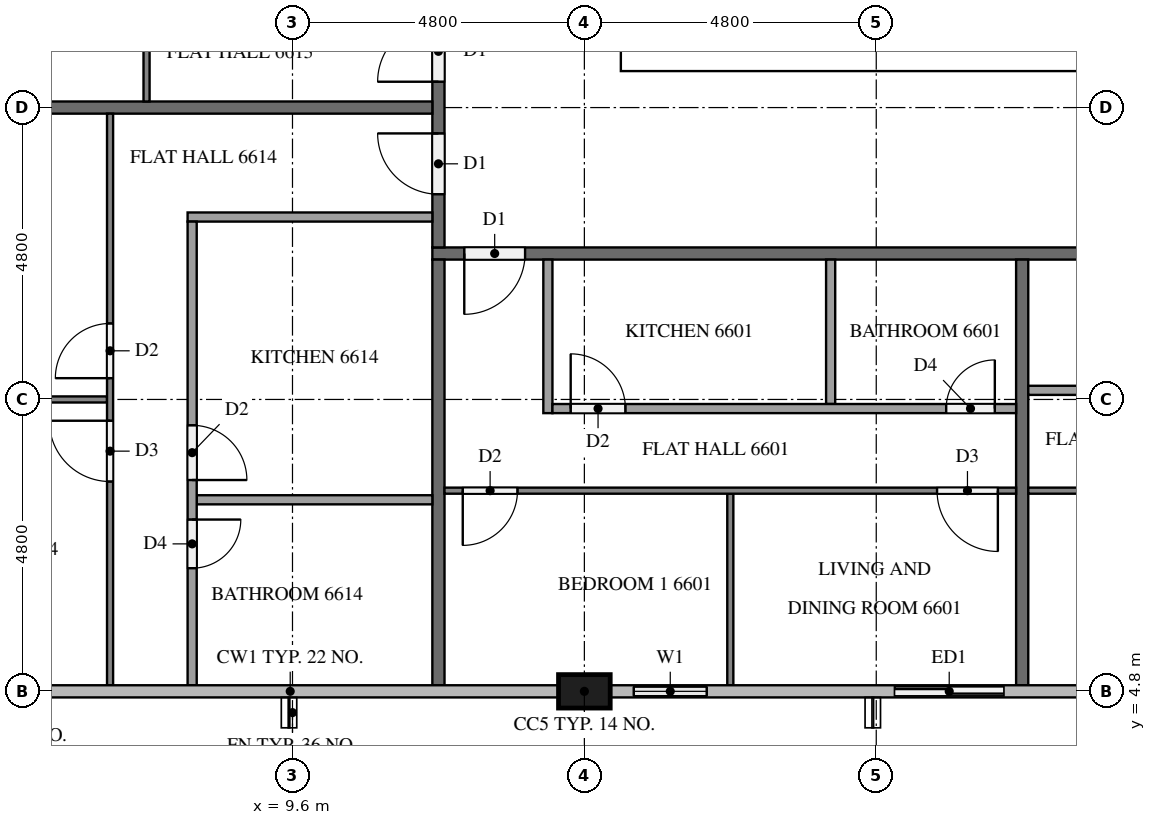
"""IFC4 building model, lengths in metres.
Left out: names, types, materials, properties, quantities, classifications, styles, units other than length and angle.
Written with IfcOpenShell. Run it as: python <this file> out.ifc"""

import sys

from ifc_helpers import new_model, si_unit, direction, frame, frame_2d, origin, origin_2d, place, context, subcontext, project, spatial, rectangle, extrude, element, fill, save


model = new_model("IFC4")
c1 = context("Model", 3, precision=1e-05, world=origin(), true_north=direction((0.0, 1.0)))
c2 = subcontext(c1, "Body", "Model", "MODEL_VIEW")
j1 = project(units=[si_unit("LENGTHUNIT", "METRE"), si_unit("PLANEANGLEUNIT", "RADIAN")], contexts=[c1])
p1 = place(None, origin())
s1 = spatial("IfcSite", under=j1, at=p1, CompositionType="ELEMENT")
p2 = place(p1, origin())
s2 = spatial("IfcBuilding", under=s1, at=p2, CompositionType="ELEMENT")
p3 = place(p2, frame((0.0, 0.0, 252.7)))
s3 = spatial("IfcBuildingStorey", under=s2, at=p3, CompositionType="ELEMENT", Elevation=252.7)
p4 = place(p3, frame((15.0, 15.3, 0.0), z_axis=(0.0, 0.0, 1.0), x_axis=(1.0, 0.0, 0.0)))
e1 = element("IfcWall", 1, at=p4, inside=s3, PredefinedType="SHEAR", context=c2, shape_type="SweptSolid", body=[
    extrude(rectangle(XDim=32.4, YDim=0.6, at=frame_2d((16.2, 0.0))), origin(), (0.0, 0.0, 1.0), 3.2),
])
p5 = place(p4, frame((15.3, 0.0, 0.0)))
e2 = element("IfcOpeningElement", 2, at=p5, cuts=e1, PredefinedType="OPENING", context=c2, shape_type="SweptSolid", body=[
    extrude(rectangle(XDim=1.8, YDim=2.1, at=frame_2d((0.9, 1.05))), frame((0.0, 0.31, 0.0), z_axis=(0.0, -1.0, 0.0), x_axis=(1.0, 0.0, 0.0)), (0.0, 0.0, 1.0), 0.62),
])
p6 = place(p3, frame((14.4, 4.8, 0.0), z_axis=(0.0, 0.0, 1.0), x_axis=(1.0, 0.0, 0.0)))
e3 = element("IfcColumn", 3, at=p6, inside=s3, PredefinedType="COLUMN", context=c2, shape_type="SweptSolid", body=[
    extrude(rectangle(XDim=0.85, YDim=0.55, at=origin_2d()), origin(), (0.0, 0.0, 1.0), 3.2),
])
p7 = place(p3, frame((14.825, 4.8, 0.0), z_axis=(0.0, 0.0, 1.0), x_axis=(1.0, 0.0, 0.0)))
e4 = element("IfcWall", 4, at=p7, inside=s3, PredefinedType="SOLIDWALL", context=c2, shape_type="SweptSolid", body=[
    extrude(rectangle(XDim=1.975, YDim=0.15, at=frame_2d((0.988, 0.0))), origin(), (0.0, 0.0, 1.0), 3.2),
])
p8 = place(p7, frame((0.387, 0.0, 0.9)))
e5 = element("IfcOpeningElement", 5, at=p8, cuts=e4, PredefinedType="OPENING", context=c2, shape_type="SweptSolid", body=[
    extrude(rectangle(XDim=1.2, YDim=1.4, at=frame_2d((0.6, 0.7))), frame((0.0, 0.085, 0.0), z_axis=(0.0, -1.0, 0.0), x_axis=(1.0, 0.0, 0.0)), (0.0, 0.0, 1.0), 0.17),
])
p9 = place(p3, frame((19.2, 4.8, 0.0), z_axis=(0.0, 0.0, 1.0), x_axis=(1.0, 0.0, 0.0)))
e6 = element("IfcWall", 6, at=p9, inside=s3, PredefinedType="SOLIDWALL", context=c2, shape_type="SweptSolid", body=[
    extrude(rectangle(XDim=2.4, YDim=0.15, at=frame_2d((1.2, 0.0))), origin(), (0.0, 0.0, 1.0), 3.2),
])
p10 = place(p9, frame((0.3, 0.0, 0.0)))
e7 = element("IfcOpeningElement", 7, at=p10, cuts=e6, PredefinedType="OPENING", context=c2, shape_type="SweptSolid", body=[
    extrude(rectangle(XDim=1.8, YDim=2.4, at=frame_2d((0.9, 1.2))), frame((0.0, 0.085, 0.0), z_axis=(0.0, -1.0, 0.0), x_axis=(1.0, 0.0, 0.0)), (0.0, 0.0, 1.0), 0.17),
])
p11 = place(p3, frame((50.5, 12.0, 0.0), z_axis=(0.0, 0.0, 1.0), x_axis=(-1.0, 0.0, 0.0)))
e8 = element("IfcWall", 8, at=p11, inside=s3, PredefinedType="PARTITIONING", context=c2, shape_type="SweptSolid", body=[
    extrude(rectangle(XDim=38.6, YDim=0.2, at=frame_2d((19.3, 0.0))), origin(), (0.0, 0.0, 1.0), 3.2),
])
p12 = place(p11, frame((37.075, 0.0, 0.0)))
e9 = element("IfcOpeningElement", 9, at=p12, cuts=e8, PredefinedType="OPENING", context=c2, shape_type="SweptSolid", body=[
    extrude(rectangle(XDim=1.0, YDim=2.1, at=frame_2d((0.5, 1.05))), frame((0.0, 0.11, 0.0), z_axis=(0.0, -1.0, 0.0), x_axis=(1.0, 0.0, 0.0)), (0.0, 0.0, 1.0), 0.22),
])
p13 = place(p11, frame((12.525, 0.0, 0.0)))
e10 = element("IfcOpeningElement", 10, at=p13, cuts=e8, PredefinedType="OPENING", context=c2, shape_type="SweptSolid", body=[
    extrude(rectangle(XDim=1.0, YDim=2.1, at=frame_2d((0.5, 1.05))), frame((0.0, 0.11, 0.0), z_axis=(0.0, -1.0, 0.0), x_axis=(1.0, 0.0, 0.0)), (0.0, 0.0, 1.0), 0.22),
])
p14 = place(p11, frame((10.675, 0.0, 0.0)))
e11 = element("IfcOpeningElement", 11, at=p14, cuts=e8, PredefinedType="OPENING", context=c2, shape_type="SweptSolid", body=[
    extrude(rectangle(XDim=1.0, YDim=2.1, at=frame_2d((0.5, 1.05))), frame((0.0, 0.11, 0.0), z_axis=(0.0, -1.0, 0.0), x_axis=(1.0, 0.0, 0.0)), (0.0, 0.0, 1.0), 0.22),
])
p15 = place(p3, frame((12.0, 12.1, 0.0), z_axis=(0.0, 0.0, 1.0), x_axis=(0.0, 1.0, 0.0)))
e12 = element("IfcWall", 12, at=p15, inside=s3, PredefinedType="PARTITIONING", context=c2, shape_type="SweptSolid", body=[
    extrude(rectangle(XDim=28.6, YDim=0.2, at=frame_2d((14.3, 0.0))), origin(), (0.0, 0.0, 1.0), 3.2),
])
p16 = place(p15, frame((26.725, 0.0, 0.0)))
e13 = element("IfcOpeningElement", 13, at=p16, cuts=e12, PredefinedType="OPENING", context=c2, shape_type="SweptSolid", body=[
    extrude(rectangle(XDim=1.0, YDim=2.1, at=frame_2d((0.5, 1.05))), frame((0.0, 0.11, 0.0), z_axis=(0.0, -1.0, 0.0), x_axis=(1.0, 0.0, 0.0)), (0.0, 0.0, 1.0), 0.22),
])
p17 = place(p15, frame((24.875, 0.0, 0.0)))
e14 = element("IfcOpeningElement", 14, at=p17, cuts=e12, PredefinedType="OPENING", context=c2, shape_type="SweptSolid", body=[
    extrude(rectangle(XDim=1.0, YDim=2.1, at=frame_2d((0.5, 1.05))), frame((0.0, 0.11, 0.0), z_axis=(0.0, -1.0, 0.0), x_axis=(1.0, 0.0, 0.0)), (0.0, 0.0, 1.0), 0.22),
])
p18 = place(p15, frame((17.675, 0.0, 0.0)))
e15 = element("IfcOpeningElement", 15, at=p18, cuts=e12, PredefinedType="OPENING", context=c2, shape_type="SweptSolid", body=[
    extrude(rectangle(XDim=1.0, YDim=2.1, at=frame_2d((0.5, 1.05))), frame((0.0, 0.11, 0.0), z_axis=(0.0, -1.0, 0.0), x_axis=(1.0, 0.0, 0.0)), (0.0, 0.0, 1.0), 0.22),
])
p19 = place(p15, frame((2.725, 0.0, 0.0)))
e16 = element("IfcOpeningElement", 16, at=p19, cuts=e12, PredefinedType="OPENING", context=c2, shape_type="SweptSolid", body=[
    extrude(rectangle(XDim=1.0, YDim=2.1, at=frame_2d((0.5, 1.05))), frame((0.0, 0.11, 0.0), z_axis=(0.0, -1.0, 0.0), x_axis=(1.0, 0.0, 0.0)), (0.0, 0.0, 1.0), 0.22),
])
p20 = place(p15, frame((0.875, 0.0, 0.0)))
e17 = element("IfcOpeningElement", 17, at=p20, cuts=e12, PredefinedType="OPENING", context=c2, shape_type="SweptSolid", body=[
    extrude(rectangle(XDim=1.0, YDim=2.1, at=frame_2d((0.5, 1.05))), frame((0.0, 0.11, 0.0), z_axis=(0.0, -1.0, 0.0), x_axis=(1.0, 0.0, 0.0)), (0.0, 0.0, 1.0), 0.22),
])
for number, where, z_axis, x_axis in (
    (18, (21.6, 11.9, 0.0), (0.0, 0.0, 1.0), (0.0, -1.0, 0.0)),
    (19, (12.0, 4.9, 0.0), (0.0, 0.0, 1.0), (0.0, 1.0, 0.0)),
):
    element("IfcWall", number, at=place(p3, frame(where, z_axis=z_axis, x_axis=x_axis)), inside=s3, PredefinedType="PARTITIONING", context=c2, shape_type="SweptSolid", body=[
        extrude(rectangle(XDim=7.0, YDim=0.2, at=frame_2d((3.5, 0.0))), origin(), (0.0, 0.0, 1.0), 3.2),
    ])
p21 = place(p3, frame((0.1, 14.4, 0.0), z_axis=(0.0, 0.0, 1.0), x_axis=(1.0, 0.0, 0.0)))
e20 = element("IfcWall", 20, at=p21, inside=s3, PredefinedType="PARTITIONING", context=c2, shape_type="SweptSolid", body=[
    extrude(rectangle(XDim=11.8, YDim=0.2, at=frame_2d((5.9, 0.0))), origin(), (0.0, 0.0, 1.0), 3.2),
])
p22 = place(p3, frame((16.8, 8.05, 0.0), z_axis=(0.0, 0.0, 1.0), x_axis=(0.0, -1.0, 0.0)))
e21 = element("IfcWall", 21, at=p22, inside=s3, PredefinedType="PARTITIONING", context=c2, shape_type="SweptSolid", body=[
    extrude(rectangle(XDim=3.15, YDim=0.1, at=frame_2d((1.575, 0.0))), origin(), (0.0, 0.0, 1.0), 3.2),
])
p23 = place(p3, frame((21.5, 8.1, 0.0), z_axis=(0.0, 0.0, 1.0), x_axis=(-1.0, 0.0, 0.0)))
e22 = element("IfcWall", 22, at=p23, inside=s3, PredefinedType="PARTITIONING", context=c2, shape_type="SweptSolid", body=[
    extrude(rectangle(XDim=9.4, YDim=0.1, at=frame_2d((4.7, 0.0))), origin(), (0.0, 0.0, 1.0), 3.2),
])
p24 = place(p23, frame((8.2, 0.0, 0.0)))
e23 = element("IfcOpeningElement", 23, at=p24, cuts=e22, PredefinedType="OPENING", context=c2, shape_type="SweptSolid", body=[
    extrude(rectangle(XDim=0.9, YDim=2.1, at=frame_2d((0.45, 1.05))), frame((0.0, 0.06, 0.0), z_axis=(0.0, -1.0, 0.0), x_axis=(1.0, 0.0, 0.0)), (0.0, 0.0, 1.0), 0.12),
])
p25 = place(p23, frame((0.3, 0.0, 0.0)))
e24 = element("IfcOpeningElement", 24, at=p25, cuts=e22, PredefinedType="OPENING", context=c2, shape_type="SweptSolid", body=[
    extrude(rectangle(XDim=1.0, YDim=2.1, at=frame_2d((0.5, 1.05))), frame((0.0, 0.06, 0.0), z_axis=(0.0, -1.0, 0.0), x_axis=(1.0, 0.0, 0.0)), (0.0, 0.0, 1.0), 0.12),
])
p26 = place(p3, frame((18.45, 11.9, 0.0), z_axis=(0.0, 0.0, 1.0), x_axis=(0.0, -1.0, 0.0)))
e25 = element("IfcWall", 25, at=p26, inside=s3, PredefinedType="PARTITIONING", context=c2, shape_type="SweptSolid", body=[
    extrude(rectangle(XDim=2.375, YDim=0.15, at=frame_2d((1.188, 0.0))), origin(), (0.0, 0.0, 1.0), 3.2),
])
p27 = place(p3, frame((13.8, 11.9, 0.0), z_axis=(0.0, 0.0, 1.0), x_axis=(0.0, -1.0, 0.0)))
e26 = element("IfcWall", 26, at=p27, inside=s3, PredefinedType="PARTITIONING", context=c2, shape_type="SweptSolid", body=[
    extrude(rectangle(XDim=2.525, YDim=0.15, at=frame_2d((1.262, 0.0))), origin(), (0.0, 0.0, 1.0), 3.2),
])
p28 = place(p3, frame((13.875, 9.45, 0.0), z_axis=(0.0, 0.0, 1.0), x_axis=(1.0, 0.0, 0.0)))
e27 = element("IfcWall", 27, at=p28, inside=s3, PredefinedType="PARTITIONING", context=c2, shape_type="SweptSolid", body=[
    extrude(rectangle(XDim=7.625, YDim=0.15, at=frame_2d((3.812, 0.0))), origin(), (0.0, 0.0, 1.0), 3.2),
])
p29 = place(p28, frame((0.3, 0.0, 0.0)))
e28 = element("IfcOpeningElement", 28, at=p29, cuts=e27, PredefinedType="OPENING", context=c2, shape_type="SweptSolid", body=[
    extrude(rectangle(XDim=0.9, YDim=2.1, at=frame_2d((0.45, 1.05))), frame((0.0, 0.085, 0.0), z_axis=(0.0, -1.0, 0.0), x_axis=(1.0, 0.0, 0.0)), (0.0, 0.0, 1.0), 0.17),
])
p30 = place(p28, frame((6.475, 0.0, 0.0)))
e29 = element("IfcOpeningElement", 29, at=p30, cuts=e27, PredefinedType="OPENING", context=c2, shape_type="SweptSolid", body=[
    extrude(rectangle(XDim=0.8, YDim=2.1, at=frame_2d((0.4, 1.05))), frame((0.0, 0.085, 0.0), z_axis=(0.0, -1.0, 0.0), x_axis=(1.0, 0.0, 0.0)), (0.0, 0.0, 1.0), 0.17),
])
p31 = place(p3, frame((38.3, 8.1, 0.0), z_axis=(0.0, 0.0, 1.0), x_axis=(-1.0, 0.0, 0.0)))
e30 = element("IfcWall", 30, at=p31, inside=s3, PredefinedType="PARTITIONING", context=c2, shape_type="SweptSolid", body=[
    extrude(rectangle(XDim=16.6, YDim=0.1, at=frame_2d((8.3, 0.0))), origin(), (0.0, 0.0, 1.0), 3.2),
])
p32 = place(p31, frame((0.3, 0.0, 0.0)))
e31 = element("IfcOpeningElement", 31, at=p32, cuts=e30, PredefinedType="OPENING", context=c2, shape_type="SweptSolid", body=[
    extrude(rectangle(XDim=0.9, YDim=2.1, at=frame_2d((0.45, 1.05))), frame((0.0, 0.06, 0.0), z_axis=(0.0, -1.0, 0.0), x_axis=(1.0, 0.0, 0.0)), (0.0, 0.0, 1.0), 0.12),
])
p33 = place(p31, frame((8.25, 0.0, 0.0)))
e32 = element("IfcOpeningElement", 32, at=p33, cuts=e30, PredefinedType="OPENING", context=c2, shape_type="SweptSolid", body=[
    extrude(rectangle(XDim=0.9, YDim=2.1, at=frame_2d((0.45, 1.05))), frame((0.0, 0.06, 0.0), z_axis=(0.0, -1.0, 0.0), x_axis=(1.0, 0.0, 0.0)), (0.0, 0.0, 1.0), 0.12),
])
p34 = place(p31, frame((9.85, 0.0, 0.0)))
e33 = element("IfcOpeningElement", 33, at=p34, cuts=e30, PredefinedType="OPENING", context=c2, shape_type="SweptSolid", body=[
    extrude(rectangle(XDim=1.0, YDim=2.1, at=frame_2d((0.5, 1.05))), frame((0.0, 0.06, 0.0), z_axis=(0.0, -1.0, 0.0), x_axis=(1.0, 0.0, 0.0)), (0.0, 0.0, 1.0), 0.12),
])
p35 = place(p3, frame((21.7, 9.75, 0.0), z_axis=(0.0, 0.0, 1.0), x_axis=(1.0, 0.0, 0.0)))
e34 = element("IfcWall", 34, at=p35, inside=s3, PredefinedType="PARTITIONING", context=c2, shape_type="SweptSolid", body=[
    extrude(rectangle(XDim=14.825, YDim=0.15, at=frame_2d((7.413, 0.0))), origin(), (0.0, 0.0, 1.0), 3.2),
])
p36 = place(p35, frame((13.725, 0.0, 0.0)))
e35 = element("IfcOpeningElement", 35, at=p36, cuts=e34, PredefinedType="OPENING", context=c2, shape_type="SweptSolid", body=[
    extrude(rectangle(XDim=0.8, YDim=2.1, at=frame_2d((0.4, 1.05))), frame((0.0, 0.085, 0.0), z_axis=(0.0, -1.0, 0.0), x_axis=(1.0, 0.0, 0.0)), (0.0, 0.0, 1.0), 0.17),
])
p37 = place(p35, frame((7.167, 0.0, 0.0)))
e36 = element("IfcOpeningElement", 36, at=p37, cuts=e34, PredefinedType="OPENING", context=c2, shape_type="SweptSolid", body=[
    extrude(rectangle(XDim=0.9, YDim=2.1, at=frame_2d((0.45, 1.05))), frame((0.0, 0.085, 0.0), z_axis=(0.0, -1.0, 0.0), x_axis=(1.0, 0.0, 0.0)), (0.0, 0.0, 1.0), 0.17),
])
p38 = place(p35, frame((5.617, 0.0, 0.0)))
e37 = element("IfcOpeningElement", 37, at=p38, cuts=e34, PredefinedType="OPENING", context=c2, shape_type="SweptSolid", body=[
    extrude(rectangle(XDim=0.9, YDim=2.1, at=frame_2d((0.45, 1.05))), frame((0.0, 0.085, 0.0), z_axis=(0.0, -1.0, 0.0), x_axis=(1.0, 0.0, 0.0)), (0.0, 0.0, 1.0), 0.17),
])
p39 = place(p3, frame((7.2, 14.5, 0.0), z_axis=(0.0, 0.0, 1.0), x_axis=(0.0, 1.0, 0.0)))
e38 = element("IfcWall", 38, at=p39, inside=s3, PredefinedType="PARTITIONING", context=c2, shape_type="SweptSolid", body=[
    extrude(rectangle(XDim=9.4, YDim=0.1, at=frame_2d((4.7, 0.0))), origin(), (0.0, 0.0, 1.0), 3.2),
])
p40 = place(p39, frame((3.45, 0.0, 0.0)))
e39 = element("IfcOpeningElement", 39, at=p40, cuts=e38, PredefinedType="OPENING", context=c2, shape_type="SweptSolid", body=[
    extrude(rectangle(XDim=0.9, YDim=2.1, at=frame_2d((0.45, 1.05))), frame((0.0, 0.06, 0.0), z_axis=(0.0, -1.0, 0.0), x_axis=(1.0, 0.0, 0.0)), (0.0, 0.0, 1.0), 0.12),
])
p41 = place(p39, frame((5.05, 0.0, 0.0)))
e40 = element("IfcOpeningElement", 40, at=p41, cuts=e38, PredefinedType="OPENING", context=c2, shape_type="SweptSolid", body=[
    extrude(rectangle(XDim=1.0, YDim=2.1, at=frame_2d((0.5, 1.05))), frame((0.0, 0.06, 0.0), z_axis=(0.0, -1.0, 0.0), x_axis=(1.0, 0.0, 0.0)), (0.0, 0.0, 1.0), 0.12),
])
p42 = place(p3, frame((6.55, 9.6, 0.0), z_axis=(0.0, 0.0, 1.0), x_axis=(-1.0, 0.0, 0.0)))
e41 = element("IfcWall", 41, at=p42, inside=s3, PredefinedType="PARTITIONING", context=c2, shape_type="SweptSolid", body=[
    extrude(rectangle(XDim=6.2, YDim=0.1, at=frame_2d((3.1, 0.0))), origin(), (0.0, 0.0, 1.0), 3.2),
])
p43 = place(p3, frame((6.6, 4.9, 0.0), z_axis=(0.0, 0.0, 1.0), x_axis=(0.0, 1.0, 0.0)))
e42 = element("IfcWall", 42, at=p43, inside=s3, PredefinedType="PARTITIONING", context=c2, shape_type="SweptSolid", body=[
    extrude(rectangle(XDim=9.4, YDim=0.1, at=frame_2d((4.7, 0.0))), origin(), (0.0, 0.0, 1.0), 3.2),
])
p44 = place(p43, frame((5.05, 0.0, 0.0)))
e43 = element("IfcOpeningElement", 43, at=p44, cuts=e42, PredefinedType="OPENING", context=c2, shape_type="SweptSolid", body=[
    extrude(rectangle(XDim=0.9, YDim=2.1, at=frame_2d((0.45, 1.05))), frame((0.0, 0.06, 0.0), z_axis=(0.0, -1.0, 0.0), x_axis=(1.0, 0.0, 0.0)), (0.0, 0.0, 1.0), 0.12),
])
p45 = place(p43, frame((3.35, 0.0, 0.0)))
e44 = element("IfcOpeningElement", 44, at=p45, cuts=e42, PredefinedType="OPENING", context=c2, shape_type="SweptSolid", body=[
    extrude(rectangle(XDim=1.0, YDim=2.1, at=frame_2d((0.5, 1.05))), frame((0.0, 0.06, 0.0), z_axis=(0.0, -1.0, 0.0), x_axis=(1.0, 0.0, 0.0)), (0.0, 0.0, 1.0), 0.12),
])
p46 = place(p3, frame((11.9, 7.95, 0.0), z_axis=(0.0, 0.0, 1.0), x_axis=(-1.0, 0.0, 0.0)))
e45 = element("IfcWall", 45, at=p46, inside=s3, PredefinedType="PARTITIONING", context=c2, shape_type="SweptSolid", body=[
    extrude(rectangle(XDim=3.875, YDim=0.15, at=frame_2d((1.938, 0.0))), origin(), (0.0, 0.0, 1.0), 3.2),
])
p47 = place(p3, frame((11.9, 12.6, 0.0), z_axis=(0.0, 0.0, 1.0), x_axis=(-1.0, 0.0, 0.0)))
e46 = element("IfcWall", 46, at=p47, inside=s3, PredefinedType="PARTITIONING", context=c2, shape_type="SweptSolid", body=[
    extrude(rectangle(XDim=4.025, YDim=0.15, at=frame_2d((2.012, 0.0))), origin(), (0.0, 0.0, 1.0), 3.2),
])
p48 = place(p3, frame((7.95, 12.525, 0.0), z_axis=(0.0, 0.0, 1.0), x_axis=(0.0, -1.0, 0.0)))
e47 = element("IfcWall", 47, at=p48, inside=s3, PredefinedType="PARTITIONING", context=c2, shape_type="SweptSolid", body=[
    extrude(rectangle(XDim=7.625, YDim=0.15, at=frame_2d((3.812, 0.0))), origin(), (0.0, 0.0, 1.0), 3.2),
])
p49 = place(p48, frame((3.35, 0.0, 0.0)))
e48 = element("IfcOpeningElement", 48, at=p49, cuts=e47, PredefinedType="OPENING", context=c2, shape_type="SweptSolid", body=[
    extrude(rectangle(XDim=0.9, YDim=2.1, at=frame_2d((0.45, 1.05))), frame((0.0, 0.085, 0.0), z_axis=(0.0, -1.0, 0.0), x_axis=(1.0, 0.0, 0.0)), (0.0, 0.0, 1.0), 0.17),
])
p50 = place(p48, frame((4.9, 0.0, 0.0)))
e49 = element("IfcOpeningElement", 49, at=p50, cuts=e47, PredefinedType="OPENING", context=c2, shape_type="SweptSolid", body=[
    extrude(rectangle(XDim=0.8, YDim=2.1, at=frame_2d((0.4, 1.05))), frame((0.0, 0.085, 0.0), z_axis=(0.0, -1.0, 0.0), x_axis=(1.0, 0.0, 0.0)), (0.0, 0.0, 1.0), 0.17),
])
p51 = place(p8, origin())
e50 = element("IfcWindow", 50, at=p51, inside=s3, PartitioningType="SINGLE_PANEL", PredefinedType="WINDOW", context=c2, shape_type="SweptSolid", body=[
    extrude(rectangle(XDim=1.2, YDim=1.4, at=frame_2d((0.6, 0.7))), frame((0.0, 0.03, 0.0), z_axis=(0.0, -1.0, 0.0), x_axis=(1.0, 0.0, 0.0)), (0.0, 0.0, 1.0), 0.06),
])
fill(e5, e50)
p52 = place(p10, origin())
e51 = element("IfcDoor", 51, at=p52, inside=s3, OperationType="SLIDING_TO_LEFT", PredefinedType="DOOR", context=c2, shape_type="SweptSolid", body=[
    extrude(rectangle(XDim=1.8, YDim=2.4, at=frame_2d((0.9, 1.2))), frame((0.0, 0.025, 0.0), z_axis=(0.0, -1.0, 0.0), x_axis=(1.0, 0.0, 0.0)), (0.0, 0.0, 1.0), 0.05),
])
fill(e7, e51)
p53 = place(p12, origin())
e52 = element("IfcDoor", 52, at=p53, inside=s3, OperationType="SINGLE_SWING_RIGHT", PredefinedType="DOOR", context=c2, shape_type="SweptSolid", body=[
    extrude(rectangle(XDim=1.0, YDim=2.1, at=frame_2d((0.5, 1.05))), frame((0.0, 0.025, 0.0), z_axis=(0.0, -1.0, 0.0), x_axis=(1.0, 0.0, 0.0)), (0.0, 0.0, 1.0), 0.05),
])
fill(e9, e52)
p54 = place(p19, origin())
e53 = element("IfcDoor", 53, at=p54, inside=s3, OperationType="SINGLE_SWING_LEFT", PredefinedType="DOOR", context=c2, shape_type="SweptSolid", body=[
    extrude(rectangle(XDim=1.0, YDim=2.1, at=frame_2d((0.5, 1.05))), frame((0.0, 0.025, 0.0), z_axis=(0.0, -1.0, 0.0), x_axis=(1.0, 0.0, 0.0)), (0.0, 0.0, 1.0), 0.05),
])
fill(e16, e53)
p55 = place(p20, origin())
e54 = element("IfcDoor", 54, at=p55, inside=s3, OperationType="SINGLE_SWING_RIGHT", PredefinedType="DOOR", context=c2, shape_type="SweptSolid", body=[
    extrude(rectangle(XDim=1.0, YDim=2.1, at=frame_2d((0.5, 1.05))), frame((0.0, 0.025, 0.0), z_axis=(0.0, -1.0, 0.0), x_axis=(1.0, 0.0, 0.0)), (0.0, 0.0, 1.0), 0.05),
])
fill(e17, e54)
p56 = place(p24, origin())
e55 = element("IfcDoor", 55, at=p56, inside=s3, OperationType="SINGLE_SWING_RIGHT", PredefinedType="DOOR", context=c2, shape_type="SweptSolid", body=[
    extrude(rectangle(XDim=0.9, YDim=2.1, at=frame_2d((0.45, 1.05))), frame((0.0, 0.025, 0.0), z_axis=(0.0, -1.0, 0.0), x_axis=(1.0, 0.0, 0.0)), (0.0, 0.0, 1.0), 0.05),
])
fill(e23, e55)
p57 = place(p25, origin())
e56 = element("IfcDoor", 56, at=p57, inside=s3, OperationType="SINGLE_SWING_LEFT", PredefinedType="DOOR", context=c2, shape_type="SweptSolid", body=[
    extrude(rectangle(XDim=1.0, YDim=2.1, at=frame_2d((0.5, 1.05))), frame((0.0, 0.025, 0.0), z_axis=(0.0, -1.0, 0.0), x_axis=(1.0, 0.0, 0.0)), (0.0, 0.0, 1.0), 0.05),
])
fill(e24, e56)
p58 = place(p29, origin())
e57 = element("IfcDoor", 57, at=p58, inside=s3, OperationType="SINGLE_SWING_LEFT", PredefinedType="DOOR", context=c2, shape_type="SweptSolid", body=[
    extrude(rectangle(XDim=0.9, YDim=2.1, at=frame_2d((0.45, 1.05))), frame((0.0, 0.025, 0.0), z_axis=(0.0, -1.0, 0.0), x_axis=(1.0, 0.0, 0.0)), (0.0, 0.0, 1.0), 0.05),
])
fill(e28, e57)
p59 = place(p30, origin())
e58 = element("IfcDoor", 58, at=p59, inside=s3, OperationType="SINGLE_SWING_RIGHT", PredefinedType="DOOR", context=c2, shape_type="SweptSolid", body=[
    extrude(rectangle(XDim=0.8, YDim=2.1, at=frame_2d((0.4, 1.05))), frame((0.0, 0.025, 0.0), z_axis=(0.0, -1.0, 0.0), x_axis=(1.0, 0.0, 0.0)), (0.0, 0.0, 1.0), 0.05),
])
fill(e29, e58)
p60 = place(p44, origin())
e59 = element("IfcDoor", 59, at=p60, inside=s3, OperationType="SINGLE_SWING_LEFT", PredefinedType="DOOR", context=c2, shape_type="SweptSolid", body=[
    extrude(rectangle(XDim=0.9, YDim=2.1, at=frame_2d((0.45, 1.05))), frame((0.0, 0.025, 0.0), z_axis=(0.0, -1.0, 0.0), x_axis=(1.0, 0.0, 0.0)), (0.0, 0.0, 1.0), 0.05),
])
fill(e43, e59)
p61 = place(p45, origin())
e60 = element("IfcDoor", 60, at=p61, inside=s3, OperationType="SINGLE_SWING_RIGHT", PredefinedType="DOOR", context=c2, shape_type="SweptSolid", body=[
    extrude(rectangle(XDim=1.0, YDim=2.1, at=frame_2d((0.5, 1.05))), frame((0.0, 0.025, 0.0), z_axis=(0.0, -1.0, 0.0), x_axis=(1.0, 0.0, 0.0)), (0.0, 0.0, 1.0), 0.05),
])
fill(e44, e60)
p62 = place(p49, origin())
e61 = element("IfcDoor", 61, at=p62, inside=s3, OperationType="SINGLE_SWING_RIGHT", PredefinedType="DOOR", context=c2, shape_type="SweptSolid", body=[
    extrude(rectangle(XDim=0.9, YDim=2.1, at=frame_2d((0.45, 1.05))), frame((0.0, 0.025, 0.0), z_axis=(0.0, -1.0, 0.0), x_axis=(1.0, 0.0, 0.0)), (0.0, 0.0, 1.0), 0.05),
])
fill(e48, e61)
p63 = place(p50, origin())
e62 = element("IfcDoor", 62, at=p63, inside=s3, OperationType="SINGLE_SWING_LEFT", PredefinedType="DOOR", context=c2, shape_type="SweptSolid", body=[
    extrude(rectangle(XDim=0.8, YDim=2.1, at=frame_2d((0.4, 1.05))), frame((0.0, 0.025, 0.0), z_axis=(0.0, -1.0, 0.0), x_axis=(1.0, 0.0, 0.0)), (0.0, 0.0, 1.0), 0.05),
])
fill(e49, e62)
save(model, sys.argv[1])
